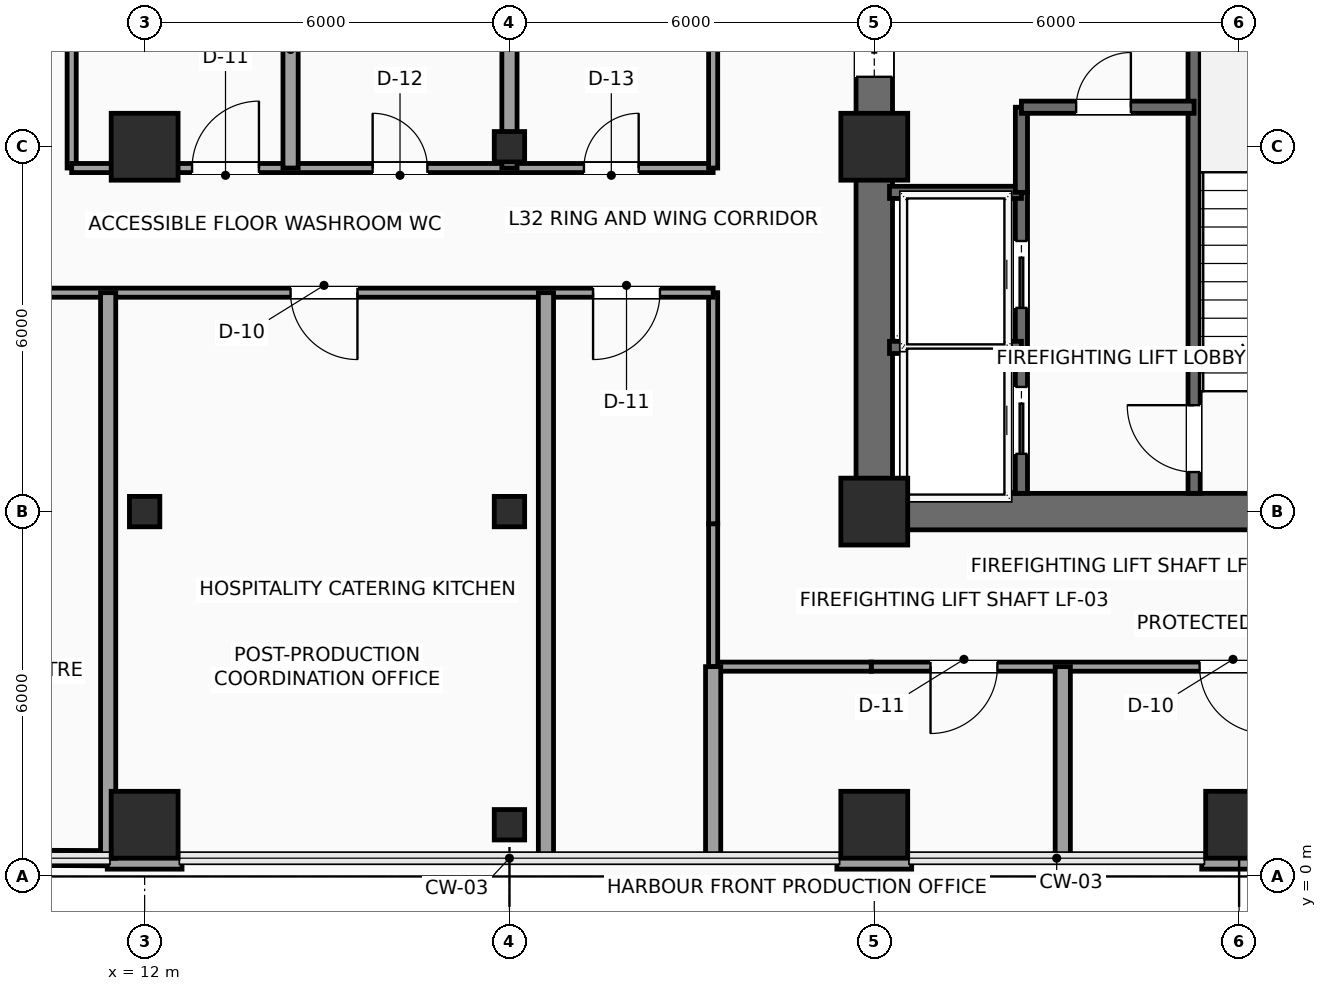
"""IFC4 building model, lengths in metres.
Left out: names, types, materials, properties, quantities, classifications, styles, units other than length and angle.
Written with IfcOpenShell. Run it as: python <this file> out.ifc"""

import sys

from ifc_helpers import new_model, si_unit, direction, frame, frame_2d, origin, origin_2d, place, context, subcontext, project, spatial, rectangle, hollow_rectangle, extrude, element, fill, save


model = new_model("IFC4")
c1 = context("Model", 3, precision=1e-05, world=origin(), true_north=direction((0.0, 1.0)))
c2 = subcontext(c1, "Body", "Model", "MODEL_VIEW")
j1 = project(units=[si_unit("LENGTHUNIT", "METRE"), si_unit("PLANEANGLEUNIT", "RADIAN")], contexts=[c1])
p1 = place(None, origin())
s1 = spatial("IfcSite", under=j1, at=p1, CompositionType="ELEMENT")
p2 = place(p1, origin())
s2 = spatial("IfcBuilding", under=s1, at=p2, CompositionType="ELEMENT")
p3 = place(p2, frame((0.0, 0.0, 134.4)))
s3 = spatial("IfcBuildingStorey", under=s2, at=p3, CompositionType="ELEMENT", Elevation=134.4)
for number, where, z_axis, x_axis in (
    (1, (24.0, 6.0, 0.0), (0.0, 0.0, 1.0), (1.0, 0.0, 0.0)),
    (2, (24.0, 12.0, 0.0), (0.0, 0.0, 1.0), (1.0, 0.0, 0.0)),
    (3, (12.0, 0.85, 0.0), (0.0, 0.0, 1.0), (1.0, 0.0, 0.0)),
):
    element("IfcColumn", number, at=place(p3, frame(where, z_axis=z_axis, x_axis=x_axis)), inside=s3, PredefinedType="COLUMN", context=c2, shape_type="SweptSolid", body=[
        extrude(rectangle(XDim=1.1, YDim=1.1, at=origin_2d()), origin(), (0.0, 0.0, 1.0), 3.75),
    ])
p4 = place(p3, frame((12.0, 6.0, 0.0), z_axis=(0.0, 0.0, 1.0), x_axis=(1.0, 0.0, 0.0)))
e4 = element("IfcColumn", 4, at=p4, inside=s3, PredefinedType="COLUMN", context=c2, shape_type="SweptSolid", body=[
    extrude(hollow_rectangle(XDim=0.5, YDim=0.5, WallThickness=0.025, InnerFilletRadius=0.025, OuterFilletRadius=0.04, at=origin_2d()), origin(), (0.0, 0.0, 1.0), 3.75),
])
p5 = place(p3, frame((12.0, 12.0, 0.0), z_axis=(0.0, 0.0, 1.0), x_axis=(1.0, 0.0, 0.0)))
e5 = element("IfcColumn", 5, at=p5, inside=s3, PredefinedType="COLUMN", context=c2, shape_type="SweptSolid", body=[
    extrude(rectangle(XDim=1.1, YDim=1.1, at=origin_2d()), origin(), (0.0, 0.0, 1.0), 3.75),
])
for number, where, z_axis, x_axis in (
    (6, (18.0, 0.85, 0.0), (0.0, 0.0, 1.0), (1.0, 0.0, 0.0)),
    (7, (18.0, 6.0, 0.0), (0.0, 0.0, 1.0), (1.0, 0.0, 0.0)),
    (8, (18.0, 12.0, 0.0), (0.0, 0.0, 1.0), (1.0, 0.0, 0.0)),
):
    element("IfcColumn", number, at=place(p3, frame(where, z_axis=z_axis, x_axis=x_axis)), inside=s3, PredefinedType="COLUMN", context=c2, shape_type="SweptSolid", body=[
        extrude(hollow_rectangle(XDim=0.5, YDim=0.5, WallThickness=0.025, InnerFilletRadius=0.025, OuterFilletRadius=0.04, at=origin_2d()), origin(), (0.0, 0.0, 1.0), 3.75),
    ])
for number, where, z_axis, x_axis in (
    (9, (24.0, 0.85, 0.0), (0.0, 0.0, 1.0), (1.0, 0.0, 0.0)),
    (10, (30.0, 0.85, 0.0), (0.0, 0.0, 1.0), (1.0, 0.0, 0.0)),
):
    element("IfcColumn", number, at=place(p3, frame(where, z_axis=z_axis, x_axis=x_axis)), inside=s3, PredefinedType="COLUMN", context=c2, shape_type="SweptSolid", body=[
        extrude(rectangle(XDim=1.1, YDim=1.1, at=origin_2d()), origin(), (0.0, 0.0, 1.0), 3.75),
    ])
for number, where, z_axis, x_axis in (
    (11, (30.615, 0.24, 0.0), (0.0, 0.0, 1.0), (-1.0, 0.0, 0.0)),
    (12, (24.615, 0.24, 0.0), (0.0, 0.0, 1.0), (-1.0, 0.0, 0.0)),
    (13, (12.615, 0.24, 0.0), (0.0, 0.0, 1.0), (-1.0, 0.0, 0.0)),
):
    element("IfcWall", number, at=place(p3, frame(where, z_axis=z_axis, x_axis=x_axis)), inside=s3, PredefinedType="SOLIDWALL", context=c2, shape_type="SweptSolid", body=[
        extrude(rectangle(XDim=1.23, YDim=0.24, at=frame_2d((0.615, 0.0))), origin(), (0.0, 0.0, 1.0), 3.525),
    ])
p6 = place(p3, frame((24.0, 6.0, 0.0), z_axis=(0.0, 0.0, 1.0), x_axis=(1.0, 0.0, 0.0)))
e14 = element("IfcWall", 14, at=p6, inside=s3, PredefinedType="SHEAR", context=c2, shape_type="SweptSolid", body=[
    extrude(rectangle(XDim=9.6, YDim=0.6, at=frame_2d((4.8, 0.0))), origin(), (0.0, 0.0, 1.0), 3.525),
])
p7 = place(p3, frame((24.0, 6.0, 0.0), z_axis=(0.0, 0.0, 1.0), x_axis=(0.0, 1.0, 0.0)))
e15 = element("IfcWall", 15, at=p7, inside=s3, PredefinedType="SHEAR", context=c2, shape_type="SweptSolid", body=[
    extrude(rectangle(XDim=12.0, YDim=0.6, at=frame_2d((6.0, 0.0))), origin(), (0.0, 0.0, 1.0), 3.525),
])
p8 = place(p7, frame((7.15, 0.0, 0.0)))
e16 = element("IfcOpeningElement", 16, at=p8, cuts=e15, PredefinedType="OPENING", context=c2, shape_type="SweptSolid", body=[
    extrude(rectangle(XDim=1.6, YDim=2.3, at=frame_2d((0.8, 1.15))), frame((0.0, 0.31, 0.0), z_axis=(0.0, -1.0, 0.0), x_axis=(1.0, 0.0, 0.0)), (0.0, 0.0, 1.0), 0.62),
])
p9 = place(p3, frame((29.26, 6.3, 0.0), z_axis=(0.0, 0.0, 1.0), x_axis=(0.0, 1.0, 0.0)))
e17 = element("IfcWall", 17, at=p9, inside=s3, PredefinedType="SHEAR", context=c2, shape_type="SweptSolid", body=[
    extrude(rectangle(XDim=8.88, YDim=0.2, at=frame_2d((4.44, 0.0))), origin(), (0.0, 0.0, 1.0), 3.525),
])
p10 = place(p9, frame((0.35, 0.0, 0.0)))
e18 = element("IfcOpeningElement", 18, at=p10, cuts=e17, PredefinedType="OPENING", context=c2, shape_type="SweptSolid", body=[
    extrude(rectangle(XDim=1.1, YDim=2.2, at=frame_2d((0.55, 1.1))), frame((0.0, 0.11, 0.0), z_axis=(0.0, -1.0, 0.0), x_axis=(1.0, 0.0, 0.0)), (0.0, 0.0, 1.0), 0.22),
])
p11 = place(p3, frame((26.42, 6.3, 0.0), z_axis=(0.0, 0.0, 1.0), x_axis=(0.0, 1.0, 0.0)))
e19 = element("IfcWall", 19, at=p11, inside=s3, PredefinedType="SHEAR", context=c2, shape_type="SweptSolid", body=[
    extrude(rectangle(XDim=4.95, YDim=0.2, at=frame_2d((2.475, 0.0))), origin(), (0.0, 0.0, 1.0), 3.525),
])
p12 = place(p11, frame((0.65, 0.0, 0.0)))
e20 = element("IfcOpeningElement", 20, at=p12, cuts=e19, PredefinedType="OPENING", context=c2, shape_type="SweptSolid", body=[
    extrude(rectangle(XDim=1.1, YDim=2.2, at=frame_2d((0.55, 1.1))), frame((0.0, 0.11, 0.0), z_axis=(0.0, -1.0, 0.0), x_axis=(1.0, 0.0, 0.0)), (0.0, 0.0, 1.0), 0.22),
])
p13 = place(p11, frame((3.05, 0.0, 0.0)))
e21 = element("IfcOpeningElement", 21, at=p13, cuts=e19, PredefinedType="OPENING", context=c2, shape_type="SweptSolid", body=[
    extrude(rectangle(XDim=1.1, YDim=2.2, at=frame_2d((0.55, 1.1))), frame((0.0, 0.11, 0.0), z_axis=(0.0, -1.0, 0.0), x_axis=(1.0, 0.0, 0.0)), (0.0, 0.0, 1.0), 0.22),
])
for number, where, z_axis, x_axis in (
    (22, (24.25, 8.7, 0.0), (0.0, 0.0, 1.0), (1.0, 0.0, 0.0)),
    (23, (24.25, 11.25, 0.0), (0.0, 0.0, 1.0), (1.0, 0.0, 0.0)),
):
    element("IfcWall", number, at=place(p3, frame(where, z_axis=z_axis, x_axis=x_axis)), inside=s3, PredefinedType="SHEAR", context=c2, shape_type="SweptSolid", body=[
        extrude(rectangle(XDim=2.17, YDim=0.2, at=frame_2d((1.085, 0.0))), origin(), (0.0, 0.0, 1.0), 3.525),
    ])
p14 = place(p3, frame((26.42, 11.25, 0.0), z_axis=(0.0, 0.0, 1.0), x_axis=(0.0, 1.0, 0.0)))
e24 = element("IfcWall", 24, at=p14, inside=s3, PredefinedType="SHEAR", context=c2, shape_type="SweptSolid", body=[
    extrude(rectangle(XDim=1.4, YDim=0.2, at=frame_2d((0.7, 0.0))), origin(), (0.0, 0.0, 1.0), 3.525),
])
p15 = place(p3, frame((26.42, 12.65, 0.0), z_axis=(0.0, 0.0, 1.0), x_axis=(1.0, 0.0, 0.0)))
e25 = element("IfcWall", 25, at=p15, inside=s3, PredefinedType="SHEAR", context=c2, shape_type="SweptSolid", body=[
    extrude(rectangle(XDim=2.84, YDim=0.2, at=frame_2d((1.42, 0.0))), origin(), (0.0, 0.0, 1.0), 3.525),
])
p16 = place(p15, frame((0.9, 0.0, 0.0)))
e26 = element("IfcOpeningElement", 26, at=p16, cuts=e25, PredefinedType="OPENING", context=c2, shape_type="SweptSolid", body=[
    extrude(rectangle(XDim=0.9, YDim=2.15, at=frame_2d((0.45, 1.075))), frame((0.0, 0.11, 0.0), z_axis=(0.0, -1.0, 0.0), x_axis=(1.0, 0.0, 0.0)), (0.0, 0.0, 1.0), 0.22),
])
p17 = place(p3, frame((36.15, 3.45, 0.0), z_axis=(0.0, 0.0, 1.0), x_axis=(-1.0, 0.0, 0.0)))
e27 = element("IfcWall", 27, at=p17, inside=s3, PredefinedType="PARTITIONING", context=c2, shape_type="SweptSolid", body=[
    extrude(rectangle(XDim=12.2, YDim=0.15, at=frame_2d((6.1, 0.0))), origin(), (0.0, 0.0, 1.0), 3.067),
])
p18 = place(p17, frame((10.125, 0.0, 0.0)))
e28 = element("IfcOpeningElement", 28, at=p18, cuts=e27, PredefinedType="OPENING", context=c2, shape_type="SweptSolid", body=[
    extrude(rectangle(XDim=1.1, YDim=2.25, at=frame_2d((0.55, 1.125))), frame((0.0, 0.085, 0.0), z_axis=(0.0, -1.0, 0.0), x_axis=(1.0, 0.0, 0.0)), (0.0, 0.0, 1.0), 0.17),
])
p19 = place(p17, frame((5.7, 0.0, 0.0)))
e29 = element("IfcOpeningElement", 29, at=p19, cuts=e27, PredefinedType="OPENING", context=c2, shape_type="SweptSolid", body=[
    extrude(rectangle(XDim=1.1, YDim=2.25, at=frame_2d((0.55, 1.125))), frame((0.0, 0.085, 0.0), z_axis=(0.0, -1.0, 0.0), x_axis=(1.0, 0.0, 0.0)), (0.0, 0.0, 1.0), 0.17),
])
p20 = place(p3, frame((23.95, 3.45, 0.0), z_axis=(0.0, 0.0, 1.0), x_axis=(-1.0, 0.0, 0.0)))
e30 = element("IfcWall", 30, at=p20, inside=s3, PredefinedType="PARTITIONING", context=c2, shape_type="SweptSolid", body=[
    extrude(rectangle(XDim=2.6, YDim=0.15, at=frame_2d((1.3, 0.0))), origin(), (0.0, 0.0, 1.0), 3.067),
])
p21 = place(p3, frame((21.35, 3.45, 0.0), z_axis=(0.0, 0.0, 1.0), x_axis=(0.0, 1.0, 0.0)))
e31 = element("IfcWall", 31, at=p21, inside=s3, PredefinedType="PARTITIONING", context=c2, shape_type="SweptSolid", body=[
    extrude(rectangle(XDim=2.35, YDim=0.15, at=frame_2d((1.175, 0.0))), origin(), (0.0, 0.0, 1.0), 3.525),
])
p22 = place(p3, frame((21.35, 5.8, 0.0), z_axis=(0.0, 0.0, 1.0), x_axis=(0.0, 1.0, 0.0)))
e32 = element("IfcWall", 32, at=p22, inside=s3, PredefinedType="PARTITIONING", context=c2, shape_type="SweptSolid", body=[
    extrude(rectangle(XDim=3.8, YDim=0.15, at=frame_2d((1.9, 0.0))), origin(), (0.0, 0.0, 1.0), 3.525),
])
p23 = place(p3, frame((21.35, 9.6, 0.0), z_axis=(0.0, 0.0, 1.0), x_axis=(-1.0, 0.0, 0.0)))
e33 = element("IfcWall", 33, at=p23, inside=s3, PredefinedType="PARTITIONING", context=c2, shape_type="SweptSolid", body=[
    extrude(rectangle(XDim=18.15, YDim=0.15, at=frame_2d((9.075, 0.0))), origin(), (0.0, 0.0, 1.0), 3.525),
])
p24 = place(p23, frame((13.55, 0.0, 0.0)))
e34 = element("IfcOpeningElement", 34, at=p24, cuts=e33, PredefinedType="OPENING", context=c2, shape_type="SweptSolid", body=[
    extrude(rectangle(XDim=1.1, YDim=2.25, at=frame_2d((0.55, 1.125))), frame((0.0, 0.085, 0.0), z_axis=(0.0, -1.0, 0.0), x_axis=(1.0, 0.0, 0.0)), (0.0, 0.0, 1.0), 0.17),
])
p25 = place(p23, frame((5.85, 0.0, 0.0)))
e35 = element("IfcOpeningElement", 35, at=p25, cuts=e33, PredefinedType="OPENING", context=c2, shape_type="SweptSolid", body=[
    extrude(rectangle(XDim=1.1, YDim=2.25, at=frame_2d((0.55, 1.125))), frame((0.0, 0.085, 0.0), z_axis=(0.0, -1.0, 0.0), x_axis=(1.0, 0.0, 0.0)), (0.0, 0.0, 1.0), 0.17),
])
p26 = place(p23, frame((0.875, 0.0, 0.0)))
e36 = element("IfcOpeningElement", 36, at=p26, cuts=e33, PredefinedType="OPENING", context=c2, shape_type="SweptSolid", body=[
    extrude(rectangle(XDim=1.1, YDim=2.25, at=frame_2d((0.55, 1.125))), frame((0.0, 0.085, 0.0), z_axis=(0.0, -1.0, 0.0), x_axis=(1.0, 0.0, 0.0)), (0.0, 0.0, 1.0), 0.17),
])
p27 = place(p3, frame((10.8, 15.55, 0.0), z_axis=(0.0, 0.0, 1.0), x_axis=(0.0, -1.0, 0.0)))
e37 = element("IfcWall", 37, at=p27, inside=s3, PredefinedType="PARTITIONING", context=c2, shape_type="SweptSolid", body=[
    extrude(rectangle(XDim=3.9, YDim=0.15, at=frame_2d((1.95, 0.0))), origin(), (0.0, 0.0, 1.0), 3.525),
])
p28 = place(p3, frame((10.8, 11.65, 0.0), z_axis=(0.0, 0.0, 1.0), x_axis=(1.0, 0.0, 0.0)))
e38 = element("IfcWall", 38, at=p28, inside=s3, PredefinedType="PARTITIONING", context=c2, shape_type="SweptSolid", body=[
    extrude(rectangle(XDim=10.55, YDim=0.15, at=frame_2d((5.275, 0.0))), origin(), (0.0, 0.0, 1.0), 3.525),
])
p29 = place(p28, frame((1.98, 0.0, 0.0)))
e39 = element("IfcOpeningElement", 39, at=p29, cuts=e38, PredefinedType="OPENING", context=c2, shape_type="SweptSolid", body=[
    extrude(rectangle(XDim=1.1, YDim=2.25, at=frame_2d((0.55, 1.125))), frame((0.0, 0.085, 0.0), z_axis=(0.0, -1.0, 0.0), x_axis=(1.0, 0.0, 0.0)), (0.0, 0.0, 1.0), 0.17),
])
p30 = place(p28, frame((4.95, 0.0, 0.0)))
e40 = element("IfcOpeningElement", 40, at=p30, cuts=e38, PredefinedType="OPENING", context=c2, shape_type="SweptSolid", body=[
    extrude(rectangle(XDim=0.9, YDim=2.1, at=frame_2d((0.45, 1.05))), frame((0.0, 0.085, 0.0), z_axis=(0.0, -1.0, 0.0), x_axis=(1.0, 0.0, 0.0)), (0.0, 0.0, 1.0), 0.17),
])
p31 = place(p28, frame((8.425, 0.0, 0.0)))
e41 = element("IfcOpeningElement", 41, at=p31, cuts=e38, PredefinedType="OPENING", context=c2, shape_type="SweptSolid", body=[
    extrude(rectangle(XDim=0.9, YDim=2.1, at=frame_2d((0.45, 1.05))), frame((0.0, 0.085, 0.0), z_axis=(0.0, -1.0, 0.0), x_axis=(1.0, 0.0, 0.0)), (0.0, 0.0, 1.0), 0.17),
])
p32 = place(p3, frame((21.35, 11.65, 0.0), z_axis=(0.0, 0.0, 1.0), x_axis=(0.0, 1.0, 0.0)))
e42 = element("IfcWall", 42, at=p32, inside=s3, PredefinedType="PARTITIONING", context=c2, shape_type="SweptSolid", body=[
    extrude(rectangle(XDim=18.6, YDim=0.15, at=frame_2d((9.3, 0.0))), origin(), (0.0, 0.0, 1.0), 3.525),
])
p33 = place(p32, frame((7.2, 0.0, 0.0)))
e43 = element("IfcOpeningElement", 43, at=p33, cuts=e42, PredefinedType="OPENING", context=c2, shape_type="SweptSolid", body=[
    extrude(rectangle(XDim=0.95, YDim=2.15, at=frame_2d((0.475, 1.075))), frame((0.0, 0.085, 0.0), z_axis=(0.0, -1.0, 0.0), x_axis=(1.0, 0.0, 0.0)), (0.0, 0.0, 1.0), 0.17),
])
p34 = place(p32, frame((10.45, 0.0, 0.0)))
e44 = element("IfcOpeningElement", 44, at=p34, cuts=e42, PredefinedType="OPENING", context=c2, shape_type="SweptSolid", body=[
    extrude(rectangle(XDim=0.9, YDim=2.1, at=frame_2d((0.45, 1.05))), frame((0.0, 0.085, 0.0), z_axis=(0.0, -1.0, 0.0), x_axis=(1.0, 0.0, 0.0)), (0.0, 0.0, 1.0), 0.17),
])
p35 = place(p32, frame((13.9, 0.0, 0.0)))
e45 = element("IfcOpeningElement", 45, at=p35, cuts=e42, PredefinedType="OPENING", context=c2, shape_type="SweptSolid", body=[
    extrude(rectangle(XDim=0.95, YDim=2.15, at=frame_2d((0.475, 1.075))), frame((0.0, 0.085, 0.0), z_axis=(0.0, -1.0, 0.0), x_axis=(1.0, 0.0, 0.0)), (0.0, 0.0, 1.0), 0.17),
])
p36 = place(p32, frame((4.6, 0.0, 0.0)))
e46 = element("IfcOpeningElement", 46, at=p36, cuts=e42, PredefinedType="OPENING", context=c2, shape_type="SweptSolid", body=[
    extrude(rectangle(XDim=1.1, YDim=2.25, at=frame_2d((0.55, 1.125))), frame((0.0, 0.085, 0.0), z_axis=(0.0, -1.0, 0.0), x_axis=(1.0, 0.0, 0.0)), (0.0, 0.0, 1.0), 0.17),
])
p37 = place(p3, frame((14.4, 11.65, 0.0), z_axis=(0.0, 0.0, 1.0), x_axis=(0.0, 1.0, 0.0)))
e47 = element("IfcWall", 47, at=p37, inside=s3, PredefinedType="PARTITIONING", context=c2, shape_type="SweptSolid", body=[
    extrude(rectangle(XDim=3.9, YDim=0.25, at=frame_2d((1.95, 0.0))), origin(), (0.0, 0.0, 1.0), 3.525),
])
p38 = place(p3, frame((18.0, 11.65, 0.0), z_axis=(0.0, 0.0, 1.0), x_axis=(0.0, 1.0, 0.0)))
e48 = element("IfcWall", 48, at=p38, inside=s3, PredefinedType="PARTITIONING", context=c2, shape_type="SweptSolid", body=[
    extrude(rectangle(XDim=3.9, YDim=0.25, at=frame_2d((1.95, 0.0))), origin(), (0.0, 0.0, 1.0), 3.017),
])
for number, where, z_axis, x_axis in (
    (49, (21.35, 0.3, 0.0), (0.0, 0.0, 1.0), (0.0, 1.0, 0.0)),
    (50, (27.1, 0.3, 0.0), (0.0, 0.0, 1.0), (0.0, 1.0, 0.0)),
):
    element("IfcWall", number, at=place(p3, frame(where, z_axis=z_axis, x_axis=x_axis)), inside=s3, PredefinedType="PARTITIONING", context=c2, shape_type="SweptSolid", body=[
        extrude(rectangle(XDim=3.15, YDim=0.25, at=frame_2d((1.575, 0.0))), origin(), (0.0, 0.0, 1.0), 3.525),
    ])
p39 = place(p3, frame((0.35, 0.35, 0.0), z_axis=(0.0, 0.0, 1.0), x_axis=(0.999989714785, -0.004535451924, 0.0)))
e51 = element("IfcWall", 51, at=p39, inside=s3, PredefinedType="PARTITIONING", context=c2, shape_type="SweptSolid", body=[
    extrude(rectangle(XDim=11.035, YDim=0.25, at=frame_2d((5.518, 0.0))), origin(), (0.0, 0.0, 1.0), 3.525),
])
for number, where, z_axis, x_axis in (
    (52, (11.4, 0.3, 0.0), (0.0, 0.0, 1.0), (0.0, 1.0, 0.0)),
    (53, (18.6, 0.3, 0.0), (0.0, 0.0, 1.0), (0.0, 1.0, 0.0)),
):
    element("IfcWall", number, at=place(p3, frame(where, z_axis=z_axis, x_axis=x_axis)), inside=s3, PredefinedType="PARTITIONING", context=c2, shape_type="SweptSolid", body=[
        extrude(rectangle(XDim=9.3, YDim=0.25, at=frame_2d((4.65, 0.0))), origin(), (0.0, 0.0, 1.0), 3.525),
    ])
p40 = place(p8, origin())
e54 = element("IfcDoor", 54, at=p40, inside=s3, OperationType="DOUBLE_DOOR_SLIDING", PredefinedType="DOOR", context=c2, shape_type="SweptSolid", body=[
    extrude(rectangle(XDim=1.6, YDim=2.3, at=frame_2d((0.8, 1.15))), frame((0.0, 0.025, 0.0), z_axis=(0.0, -1.0, 0.0), x_axis=(1.0, 0.0, 0.0)), (0.0, 0.0, 1.0), 0.05),
])
fill(e16, e54)
p41 = place(p10, origin())
e55 = element("IfcDoor", 55, at=p41, inside=s3, OperationType="SINGLE_SWING_RIGHT", PredefinedType="DOOR", context=c2, shape_type="SweptSolid", body=[
    extrude(rectangle(XDim=1.1, YDim=2.2, at=frame_2d((0.55, 1.1))), frame((0.0, 0.025, 0.0), z_axis=(0.0, -1.0, 0.0), x_axis=(1.0, 0.0, 0.0)), (0.0, 0.0, 1.0), 0.05),
])
fill(e18, e55)
p42 = place(p12, origin())
e56 = element("IfcDoor", 56, at=p42, inside=s3, OperationType="SLIDING_TO_LEFT", PredefinedType="DOOR", context=c2, shape_type="SweptSolid", body=[
    extrude(rectangle(XDim=1.1, YDim=2.2, at=frame_2d((0.55, 1.1))), frame((0.0, 0.025, 0.0), z_axis=(0.0, -1.0, 0.0), x_axis=(1.0, 0.0, 0.0)), (0.0, 0.0, 1.0), 0.05),
])
fill(e20, e56)
p43 = place(p13, origin())
e57 = element("IfcDoor", 57, at=p43, inside=s3, OperationType="SLIDING_TO_LEFT", PredefinedType="DOOR", context=c2, shape_type="SweptSolid", body=[
    extrude(rectangle(XDim=1.1, YDim=2.2, at=frame_2d((0.55, 1.1))), frame((0.0, 0.025, 0.0), z_axis=(0.0, -1.0, 0.0), x_axis=(1.0, 0.0, 0.0)), (0.0, 0.0, 1.0), 0.05),
])
fill(e21, e57)
p44 = place(p16, origin())
e58 = element("IfcDoor", 58, at=p44, inside=s3, OperationType="SINGLE_SWING_RIGHT", PredefinedType="DOOR", context=c2, shape_type="SweptSolid", body=[
    extrude(rectangle(XDim=0.9, YDim=2.15, at=frame_2d((0.45, 1.075))), frame((0.0, 0.025, 0.0), z_axis=(0.0, -1.0, 0.0), x_axis=(1.0, 0.0, 0.0)), (0.0, 0.0, 1.0), 0.05),
])
fill(e26, e58)
p45 = place(p18, origin())
e59 = element("IfcDoor", 59, at=p45, inside=s3, OperationType="SINGLE_SWING_RIGHT", PredefinedType="DOOR", context=c2, shape_type="SweptSolid", body=[
    extrude(rectangle(XDim=1.1, YDim=2.25, at=frame_2d((0.55, 1.125))), frame((0.0, 0.025, 0.0), z_axis=(0.0, -1.0, 0.0), x_axis=(1.0, 0.0, 0.0)), (0.0, 0.0, 1.0), 0.05),
])
fill(e28, e59)
p46 = place(p19, origin())
e60 = element("IfcDoor", 60, at=p46, inside=s3, OperationType="SINGLE_SWING_LEFT", PredefinedType="DOOR", context=c2, shape_type="SweptSolid", body=[
    extrude(rectangle(XDim=1.1, YDim=2.25, at=frame_2d((0.55, 1.125))), frame((0.0, 0.025, 0.0), z_axis=(0.0, -1.0, 0.0), x_axis=(1.0, 0.0, 0.0)), (0.0, 0.0, 1.0), 0.05),
])
fill(e29, e60)
p47 = place(p25, origin())
e61 = element("IfcDoor", 61, at=p47, inside=s3, OperationType="SINGLE_SWING_LEFT", PredefinedType="DOOR", context=c2, shape_type="SweptSolid", body=[
    extrude(rectangle(XDim=1.1, YDim=2.25, at=frame_2d((0.55, 1.125))), frame((0.0, 0.025, 0.0), z_axis=(0.0, -1.0, 0.0), x_axis=(1.0, 0.0, 0.0)), (0.0, 0.0, 1.0), 0.05),
])
fill(e35, e61)
p48 = place(p26, origin())
e62 = element("IfcDoor", 62, at=p48, inside=s3, OperationType="SINGLE_SWING_RIGHT", PredefinedType="DOOR", context=c2, shape_type="SweptSolid", body=[
    extrude(rectangle(XDim=1.1, YDim=2.25, at=frame_2d((0.55, 1.125))), frame((0.0, 0.025, 0.0), z_axis=(0.0, -1.0, 0.0), x_axis=(1.0, 0.0, 0.0)), (0.0, 0.0, 1.0), 0.05),
])
fill(e36, e62)
p49 = place(p29, origin())
e63 = element("IfcDoor", 63, at=p49, inside=s3, OperationType="SINGLE_SWING_RIGHT", PredefinedType="DOOR", context=c2, shape_type="SweptSolid", body=[
    extrude(rectangle(XDim=1.1, YDim=2.25, at=frame_2d((0.55, 1.125))), frame((0.0, 0.025, 0.0), z_axis=(0.0, -1.0, 0.0), x_axis=(1.0, 0.0, 0.0)), (0.0, 0.0, 1.0), 0.05),
])
fill(e39, e63)
p50 = place(p30, origin())
e64 = element("IfcDoor", 64, at=p50, inside=s3, OperationType="SINGLE_SWING_LEFT", PredefinedType="DOOR", context=c2, shape_type="SweptSolid", body=[
    extrude(rectangle(XDim=0.9, YDim=2.1, at=frame_2d((0.45, 1.05))), frame((0.0, 0.025, 0.0), z_axis=(0.0, -1.0, 0.0), x_axis=(1.0, 0.0, 0.0)), (0.0, 0.0, 1.0), 0.05),
])
fill(e40, e64)
p51 = place(p31, origin())
e65 = element("IfcDoor", 65, at=p51, inside=s3, OperationType="SINGLE_SWING_RIGHT", PredefinedType="DOOR", context=c2, shape_type="SweptSolid", body=[
    extrude(rectangle(XDim=0.9, YDim=2.1, at=frame_2d((0.45, 1.05))), frame((0.0, 0.025, 0.0), z_axis=(0.0, -1.0, 0.0), x_axis=(1.0, 0.0, 0.0)), (0.0, 0.0, 1.0), 0.05),
])
fill(e41, e65)
save(model, sys.argv[1])
